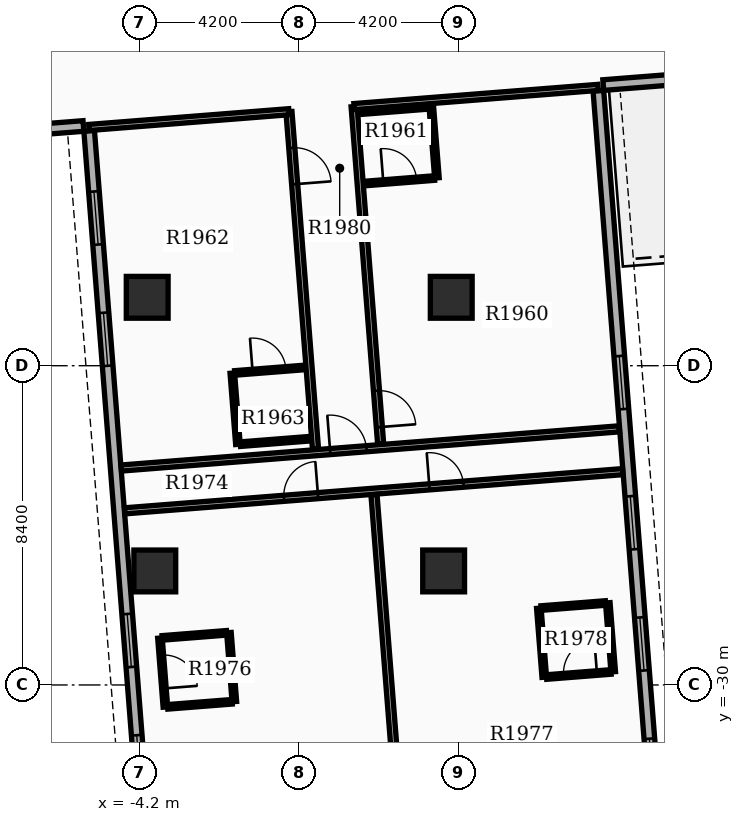
"""IFC4 building model, lengths in metres.
Left out: names, types, materials, properties, quantities, classifications, styles, units other than length and angle.
Written with IfcOpenShell. Run it as: python <this file> out.ifc"""

import sys

from ifc_helpers import new_model, si_unit, direction, frame, frame_2d, origin, origin_2d, place, context, subcontext, project, spatial, rectangle, extrude, element, fill, save


model = new_model("IFC4")
c1 = context("Model", 3, precision=1e-05, world=origin(), true_north=direction((0.0, 1.0)))
c2 = subcontext(c1, "Body", "Model", "MODEL_VIEW")
j1 = project(units=[si_unit("LENGTHUNIT", "METRE"), si_unit("PLANEANGLEUNIT", "RADIAN")], contexts=[c1])
p1 = place(None, origin())
s1 = spatial("IfcSite", under=j1, at=p1, CompositionType="ELEMENT")
p2 = place(p1, origin())
s2 = spatial("IfcBuilding", under=s1, at=p2, CompositionType="ELEMENT")
p3 = place(p2, frame((0.0, 0.0, 124.2)))
s3 = spatial("IfcBuildingStorey", under=s2, at=p3, CompositionType="ELEMENT", Elevation=124.2)
for number, where, z_axis, x_axis in (
    (1, (-4.0, -19.8, 0.0), (0.0, 0.0, 1.0), (1.0, 0.0, 0.0)),
    (2, (4.0, -19.8, 0.0), (0.0, 0.0, 1.0), (1.0, 0.0, 0.0)),
    (3, (-3.8, -27.0, 0.0), (0.0, 0.0, 1.0), (1.0, 0.0, 0.0)),
    (4, (3.8, -27.0, 0.0), (0.0, 0.0, 1.0), (1.0, 0.0, 0.0)),
):
    element("IfcColumn", number, at=place(p3, frame(where, z_axis=z_axis, x_axis=x_axis)), inside=s3, PredefinedType="COLUMN", context=c2, shape_type="SweptSolid", body=[
        extrude(rectangle(XDim=1.1, YDim=1.1, at=origin_2d()), origin(), (0.0, 0.0, 1.0), 3.9),
    ])
p4 = place(p3, frame((-5.527, -15.421, 0.0), z_axis=(0.0, 0.0, 1.0), x_axis=(0.078452802979, -0.996917828963, 0.0)))
e5 = element("IfcWall", 5, at=p4, inside=s3, PredefinedType="STANDARD", context=c2, shape_type="SweptSolid", body=[
    extrude(rectangle(XDim=20.1, YDim=0.28, at=frame_2d((10.05, 0.0))), origin(), (0.0, 0.0, 1.0), 2.97),
])
p5 = place(p4, frame((1.6, 0.0, 0.8)))
e6 = element("IfcOpeningElement", 6, at=p5, cuts=e5, PredefinedType="OPENING", context=c2, shape_type="SweptSolid", body=[
    extrude(rectangle(XDim=1.4, YDim=1.6, at=frame_2d((0.7, 0.8))), frame((0.0, 0.15, 0.0), z_axis=(0.0, -1.0, 0.0), x_axis=(1.0, 0.0, 0.0)), (0.0, 0.0, 1.0), 0.3),
])
p6 = place(p4, frame((4.8, 0.0, 0.8)))
e7 = element("IfcOpeningElement", 7, at=p6, cuts=e5, PredefinedType="OPENING", context=c2, shape_type="SweptSolid", body=[
    extrude(rectangle(XDim=1.4, YDim=1.6, at=frame_2d((0.7, 0.8))), frame((0.0, 0.15, 0.0), z_axis=(0.0, -1.0, 0.0), x_axis=(1.0, 0.0, 0.0)), (0.0, 0.0, 1.0), 0.3),
])
p7 = place(p4, frame((12.75, 0.0, 0.8)))
e8 = element("IfcOpeningElement", 8, at=p7, cuts=e5, PredefinedType="OPENING", context=c2, shape_type="SweptSolid", body=[
    extrude(rectangle(XDim=1.4, YDim=1.6, at=frame_2d((0.7, 0.8))), frame((0.0, 0.15, 0.0), z_axis=(0.0, -1.0, 0.0), x_axis=(1.0, 0.0, 0.0)), (0.0, 0.0, 1.0), 0.3),
])
p8 = place(p4, frame((15.95, 0.0, 0.8)))
e9 = element("IfcOpeningElement", 9, at=p8, cuts=e5, PredefinedType="OPENING", context=c2, shape_type="SweptSolid", body=[
    extrude(rectangle(XDim=1.4, YDim=1.6, at=frame_2d((0.7, 0.8))), frame((0.0, 0.15, 0.0), z_axis=(0.0, -1.0, 0.0), x_axis=(1.0, 0.0, 0.0)), (0.0, 0.0, 1.0), 0.3),
])
p9 = place(p3, frame((9.448, -34.405, 0.0), z_axis=(0.0, 0.0, 1.0), x_axis=(-0.078452802979, 0.996917828963, 0.0)))
e10 = element("IfcWall", 10, at=p9, inside=s3, PredefinedType="STANDARD", context=c2, shape_type="SweptSolid", body=[
    extrude(rectangle(XDim=20.1, YDim=0.28, at=frame_2d((10.05, 0.0))), origin(), (0.0, 0.0, 1.0), 2.97),
])
p10 = place(p9, frame((1.6, 0.0, 0.8)))
e11 = element("IfcOpeningElement", 11, at=p10, cuts=e10, PredefinedType="OPENING", context=c2, shape_type="SweptSolid", body=[
    extrude(rectangle(XDim=1.4, YDim=1.6, at=frame_2d((0.7, 0.8))), frame((0.0, 0.15, 0.0), z_axis=(0.0, -1.0, 0.0), x_axis=(1.0, 0.0, 0.0)), (0.0, 0.0, 1.0), 0.3),
])
p11 = place(p9, frame((4.8, 0.0, 0.8)))
e12 = element("IfcOpeningElement", 12, at=p11, cuts=e10, PredefinedType="OPENING", context=c2, shape_type="SweptSolid", body=[
    extrude(rectangle(XDim=1.4, YDim=1.6, at=frame_2d((0.7, 0.8))), frame((0.0, 0.15, 0.0), z_axis=(0.0, -1.0, 0.0), x_axis=(1.0, 0.0, 0.0)), (0.0, 0.0, 1.0), 0.3),
])
p12 = place(p9, frame((8.0, 0.0, 0.8)))
e13 = element("IfcOpeningElement", 13, at=p12, cuts=e10, PredefinedType="OPENING", context=c2, shape_type="SweptSolid", body=[
    extrude(rectangle(XDim=1.4, YDim=1.6, at=frame_2d((0.7, 0.8))), frame((0.0, 0.15, 0.0), z_axis=(0.0, -1.0, 0.0), x_axis=(1.0, 0.0, 0.0)), (0.0, 0.0, 1.0), 0.3),
])
p13 = place(p9, frame((11.7, 0.0, 0.8)))
e14 = element("IfcOpeningElement", 14, at=p13, cuts=e10, PredefinedType="OPENING", context=c2, shape_type="SweptSolid", body=[
    extrude(rectangle(XDim=1.4, YDim=1.6, at=frame_2d((0.7, 0.8))), frame((0.0, 0.15, 0.0), z_axis=(0.0, -1.0, 0.0), x_axis=(1.0, 0.0, 0.0)), (0.0, 0.0, 1.0), 0.3),
])
p14 = place(p3, frame((-11.958, -15.787, 0.0), z_axis=(0.0, 0.0, 1.0), x_axis=(0.996916125428, 0.078474447191, 0.0)))
e15 = element("IfcWall", 15, at=p14, inside=s3, PredefinedType="STANDARD", context=c2, shape_type="SweptSolid", body=[
    extrude(rectangle(XDim=6.3, YDim=0.28, at=frame_2d((3.15, 0.0))), origin(), (0.0, 0.0, 1.0), 2.97),
])
p15 = place(p3, frame((14.281, -13.722, 0.0), z_axis=(0.0, 0.0, 1.0), x_axis=(-0.99691915642, -0.078435932851, 0.0)))
e16 = element("IfcWall", 16, at=p15, inside=s3, PredefinedType="STANDARD", context=c2, shape_type="SweptSolid", body=[
    extrude(rectangle(XDim=6.3, YDim=0.28, at=frame_2d((3.15, 0.0))), origin(), (0.0, 0.0, 1.0), 2.97),
])
p16 = place(p3, frame((1.444, -14.782, 0.0), z_axis=(0.0, 0.0, 1.0), x_axis=(0.078454258523, -0.996917714418, 0.0)))
e17 = element("IfcWall", 17, at=p16, inside=s3, PredefinedType="PARTITIONING", context=c2, shape_type="SweptSolid", body=[
    extrude(rectangle(XDim=8.9, YDim=0.16, at=frame_2d((4.45, 0.0))), origin(), (0.0, 0.0, 1.0), 2.96),
])
p17 = place(p16, frame((7.5, 0.0, 0.0)))
e18 = element("IfcOpeningElement", 18, at=p17, cuts=e17, PredefinedType="OPENING", context=c2, shape_type="SweptSolid", body=[
    extrude(rectangle(XDim=0.96, YDim=2.15, at=frame_2d((0.48, 1.075))), frame((0.0, 0.09, 0.0), z_axis=(0.0, -1.0, 0.0), x_axis=(1.0, 0.0, 0.0)), (0.0, 0.0, 1.0), 0.18),
])
p18 = place(p3, frame((1.444, -14.782, 0.0), z_axis=(0.0, 0.0, 1.0), x_axis=(0.996919168289, 0.078435781998, 0.0)))
e19 = element("IfcWall", 19, at=p18, inside=s3, PredefinedType="PARTITIONING", context=c2, shape_type="SweptSolid", body=[
    extrude(rectangle(XDim=6.44, YDim=0.16, at=frame_2d((3.22, 0.0))), origin(), (0.0, 0.0, 1.0), 2.96),
])
p19 = place(p3, frame((1.744, -16.805, 0.0), z_axis=(0.0, 0.0, 1.0), x_axis=(0.996916400774, 0.0784709492, 0.0)))
e20 = element("IfcWall", 20, at=p19, inside=s3, PredefinedType="PARTITIONING", context=c2, shape_type="SweptSolid", body=[
    extrude(rectangle(XDim=1.82, YDim=0.12, at=frame_2d((0.91, 0.0))), origin(), (0.0, 0.0, 1.0), 2.96),
])
p20 = place(p19, frame((0.47, 0.0, 0.0)))
e21 = element("IfcOpeningElement", 21, at=p20, cuts=e20, PredefinedType="OPENING", context=c2, shape_type="SweptSolid", body=[
    extrude(rectangle(XDim=0.88, YDim=2.1, at=frame_2d((0.44, 1.05))), frame((0.0, 0.07, 0.0), z_axis=(0.0, -1.0, 0.0), x_axis=(1.0, 0.0, 0.0)), (0.0, 0.0, 1.0), 0.14),
])
p21 = place(p3, frame((1.596, -14.931, 0.0), z_axis=(0.0, 0.0, 1.0), x_axis=(0.996916400774, 0.0784709492, 0.0)))
e22 = element("IfcWall", 22, at=p21, inside=s3, PredefinedType="PARTITIONING", context=c2, shape_type="SweptSolid", body=[
    extrude(rectangle(XDim=1.82, YDim=0.12, at=frame_2d((0.91, 0.0))), origin(), (0.0, 0.0, 1.0), 2.96),
])
p22 = place(p3, frame((3.476, -14.783, 0.0), z_axis=(0.0, 0.0, 1.0), x_axis=(0.078444342213, -0.99691849475, 0.0)))
e23 = element("IfcWall", 23, at=p22, inside=s3, PredefinedType="PARTITIONING", context=c2, shape_type="SweptSolid", body=[
    extrude(rectangle(XDim=1.88, YDim=0.12, at=frame_2d((0.94, 0.0))), origin(), (0.0, 0.0, 1.0), 2.96),
])
p23 = place(p3, frame((-0.271, -14.917, 0.0), z_axis=(0.0, 0.0, 1.0), x_axis=(0.078454258523, -0.996917714418, 0.0)))
e24 = element("IfcWall", 24, at=p23, inside=s3, PredefinedType="PARTITIONING", context=c2, shape_type="SweptSolid", body=[
    extrude(rectangle(XDim=8.9, YDim=0.16, at=frame_2d((4.45, 0.0))), origin(), (0.0, 0.0, 1.0), 2.96),
])
p24 = place(p23, frame((0.953, 0.0, 0.0)))
e25 = element("IfcOpeningElement", 25, at=p24, cuts=e24, PredefinedType="OPENING", context=c2, shape_type="SweptSolid", body=[
    extrude(rectangle(XDim=0.96, YDim=2.15, at=frame_2d((0.48, 1.075))), frame((0.0, 0.09, 0.0), z_axis=(0.0, -1.0, 0.0), x_axis=(1.0, 0.0, 0.0)), (0.0, 0.0, 1.0), 0.18),
])
p25 = place(p3, frame((-0.271, -14.917, 0.0), z_axis=(0.0, 0.0, 1.0), x_axis=(-0.996916642178, -0.078467882272, 0.0)))
e26 = element("IfcWall", 26, at=p25, inside=s3, PredefinedType="PARTITIONING", context=c2, shape_type="SweptSolid", body=[
    extrude(rectangle(XDim=5.28, YDim=0.16, at=frame_2d((2.64, 0.0))), origin(), (0.0, 0.0, 1.0), 2.96),
])
p26 = place(p3, frame((-1.696, -21.79, 0.0), z_axis=(0.0, 0.0, 1.0), x_axis=(0.996916400774, 0.0784709492, 0.0)))
e27 = element("IfcWall", 27, at=p26, inside=s3, PredefinedType="PARTITIONING", context=c2, shape_type="SweptSolid", body=[
    extrude(rectangle(XDim=1.82, YDim=0.12, at=frame_2d((0.91, 0.0))), origin(), (0.0, 0.0, 1.0), 2.96),
])
p27 = place(p26, frame((0.47, 0.0, 0.0)))
e28 = element("IfcOpeningElement", 28, at=p27, cuts=e27, PredefinedType="OPENING", context=c2, shape_type="SweptSolid", body=[
    extrude(rectangle(XDim=0.88, YDim=2.1, at=frame_2d((0.44, 1.05))), frame((0.0, 0.07, 0.0), z_axis=(0.0, -1.0, 0.0), x_axis=(1.0, 0.0, 0.0)), (0.0, 0.0, 1.0), 0.14),
])
p28 = place(p3, frame((-1.548, -23.664, 0.0), z_axis=(0.0, 0.0, 1.0), x_axis=(0.996916400774, 0.0784709492, 0.0)))
e29 = element("IfcWall", 29, at=p28, inside=s3, PredefinedType="PARTITIONING", context=c2, shape_type="SweptSolid", body=[
    extrude(rectangle(XDim=1.82, YDim=0.12, at=frame_2d((0.91, 0.0))), origin(), (0.0, 0.0, 1.0), 2.96),
])
p29 = place(p3, frame((-1.76, -21.795, 0.0), z_axis=(0.0, 0.0, 1.0), x_axis=(0.078573415792, -0.996908329954, 0.0)))
e30 = element("IfcWall", 30, at=p29, inside=s3, PredefinedType="PARTITIONING", context=c2, shape_type="SweptSolid", body=[
    extrude(rectangle(XDim=1.88, YDim=0.12, at=frame_2d((0.94, 0.0))), origin(), (0.0, 0.0, 1.0), 2.96),
])
p30 = place(p3, frame((-4.68, -24.292, 0.0), z_axis=(0.0, 0.0, 1.0), x_axis=(0.996917447065, 0.078457655694, 0.0)))
e31 = element("IfcWall", 31, at=p30, inside=s3, PredefinedType="PARTITIONING", context=c2, shape_type="SweptSolid", body=[
    extrude(rectangle(XDim=13.144, YDim=0.16, at=frame_2d((6.572, 0.0))), origin(), (0.0, 0.0, 1.0), 2.96),
])
p31 = place(p30, frame((5.512, 0.0, 0.0)))
e32 = element("IfcOpeningElement", 32, at=p31, cuts=e31, PredefinedType="OPENING", context=c2, shape_type="SweptSolid", body=[
    extrude(rectangle(XDim=0.96, YDim=2.15, at=frame_2d((0.48, 1.075))), frame((0.0, 0.09, 0.0), z_axis=(0.0, -1.0, 0.0), x_axis=(1.0, 0.0, 0.0)), (0.0, 0.0, 1.0), 0.18),
])
p32 = place(p3, frame((-4.592, -25.419, 0.0), z_axis=(0.0, 0.0, 1.0), x_axis=(0.996915994096, 0.078476115573, 0.0)))
e33 = element("IfcWall", 33, at=p32, inside=s3, PredefinedType="PARTITIONING", context=c2, shape_type="SweptSolid", body=[
    extrude(rectangle(XDim=13.144, YDim=0.16, at=frame_2d((6.572, 0.0))), origin(), (0.0, 0.0, 1.0), 2.96),
])
p33 = place(p32, frame((4.202, 0.0, 0.0)))
e34 = element("IfcOpeningElement", 34, at=p33, cuts=e33, PredefinedType="OPENING", context=c2, shape_type="SweptSolid", body=[
    extrude(rectangle(XDim=0.9, YDim=2.15, at=frame_2d((0.45, 1.075))), frame((0.0, 0.09, 0.0), z_axis=(0.0, -1.0, 0.0), x_axis=(1.0, 0.0, 0.0)), (0.0, 0.0, 1.0), 0.18),
])
p34 = place(p32, frame((8.042, 0.0, 0.0)))
e35 = element("IfcOpeningElement", 35, at=p34, cuts=e33, PredefinedType="OPENING", context=c2, shape_type="SweptSolid", body=[
    extrude(rectangle(XDim=0.9, YDim=2.15, at=frame_2d((0.45, 1.075))), frame((0.0, 0.09, 0.0), z_axis=(0.0, -1.0, 0.0), x_axis=(1.0, 0.0, 0.0)), (0.0, 0.0, 1.0), 0.18),
])
p35 = place(p3, frame((1.967, -24.993, 0.0), z_axis=(0.0, 0.0, 1.0), x_axis=(0.078446753713, -0.996918304994, 0.0)))
e36 = element("IfcWall", 36, at=p35, inside=s3, PredefinedType="PARTITIONING", context=c2, shape_type="SweptSolid", body=[
    extrude(rectangle(XDim=9.962, YDim=0.16, at=frame_2d((4.981, 0.0))), origin(), (0.0, 0.0, 1.0), 2.96),
])
p36 = place(p3, frame((-3.664, -28.766, 0.0), z_axis=(0.0, 0.0, 1.0), x_axis=(0.0784709492, -0.996916400774, 0.0)))
e37 = element("IfcWall", 37, at=p36, inside=s3, PredefinedType="PARTITIONING", context=c2, shape_type="SweptSolid", body=[
    extrude(rectangle(XDim=1.82, YDim=0.12, at=frame_2d((0.91, 0.0))), origin(), (0.0, 0.0, 1.0), 2.96),
])
p37 = place(p36, frame((0.45, 0.0, 0.0)))
e38 = element("IfcOpeningElement", 38, at=p37, cuts=e37, PredefinedType="OPENING", context=c2, shape_type="SweptSolid", body=[
    extrude(rectangle(XDim=0.88, YDim=2.1, at=frame_2d((0.44, 1.05))), frame((0.0, 0.07, 0.0), z_axis=(0.0, -1.0, 0.0), x_axis=(1.0, 0.0, 0.0)), (0.0, 0.0, 1.0), 0.14),
])
p38 = place(p3, frame((-1.85, -28.623, 0.0), z_axis=(0.0, 0.0, 1.0), x_axis=(0.0784709492, -0.996916400774, 0.0)))
e39 = element("IfcWall", 39, at=p38, inside=s3, PredefinedType="PARTITIONING", context=c2, shape_type="SweptSolid", body=[
    extrude(rectangle(XDim=1.82, YDim=0.12, at=frame_2d((0.91, 0.0))), origin(), (0.0, 0.0, 1.0), 2.96),
])
p39 = place(p3, frame((-3.604, -28.761, 0.0), z_axis=(0.0, 0.0, 1.0), x_axis=(0.996920349899, 0.078420762289, 0.0)))
e40 = element("IfcWall", 40, at=p39, inside=s3, PredefinedType="PARTITIONING", context=c2, shape_type="SweptSolid", body=[
    extrude(rectangle(XDim=1.7, YDim=0.12, at=frame_2d((0.85, 0.0))), origin(), (0.0, 0.0, 1.0), 2.96),
])
p40 = place(p3, frame((-3.462, -30.576, 0.0), z_axis=(0.0, 0.0, 1.0), x_axis=(0.996909111094, 0.078563504361, 0.0)))
e41 = element("IfcWall", 41, at=p40, inside=s3, PredefinedType="PARTITIONING", context=c2, shape_type="SweptSolid", body=[
    extrude(rectangle(XDim=1.7, YDim=0.12, at=frame_2d((0.85, 0.0))), origin(), (0.0, 0.0, 1.0), 2.96),
])
p41 = place(p3, frame((6.305, -27.982, 0.0), z_axis=(0.0, 0.0, 1.0), x_axis=(0.078481444107, -0.996915574626, 0.0)))
e42 = element("IfcWall", 42, at=p41, inside=s3, PredefinedType="PARTITIONING", context=c2, shape_type="SweptSolid", body=[
    extrude(rectangle(XDim=1.82, YDim=0.12, at=frame_2d((0.91, 0.0))), origin(), (0.0, 0.0, 1.0), 2.96),
])
p42 = place(p3, frame((8.119, -27.839, 0.0), z_axis=(0.0, 0.0, 1.0), x_axis=(0.0784709492, -0.996916400774, 0.0)))
e43 = element("IfcWall", 43, at=p42, inside=s3, PredefinedType="PARTITIONING", context=c2, shape_type="SweptSolid", body=[
    extrude(rectangle(XDim=1.82, YDim=0.12, at=frame_2d((0.91, 0.0))), origin(), (0.0, 0.0, 1.0), 2.96),
])
p43 = place(p3, frame((6.365, -27.977, 0.0), z_axis=(0.0, 0.0, 1.0), x_axis=(0.996920349899, 0.078420762289, 0.0)))
e44 = element("IfcWall", 44, at=p43, inside=s3, PredefinedType="PARTITIONING", context=c2, shape_type="SweptSolid", body=[
    extrude(rectangle(XDim=1.7, YDim=0.12, at=frame_2d((0.85, 0.0))), origin(), (0.0, 0.0, 1.0), 2.96),
])
p44 = place(p3, frame((6.508, -29.791, 0.0), z_axis=(0.0, 0.0, 1.0), x_axis=(0.996920349899, 0.078420762289, 0.0)))
e45 = element("IfcWall", 45, at=p44, inside=s3, PredefinedType="PARTITIONING", context=c2, shape_type="SweptSolid", body=[
    extrude(rectangle(XDim=1.7, YDim=0.12, at=frame_2d((0.85, 0.0))), origin(), (0.0, 0.0, 1.0), 2.96),
])
p45 = place(p44, frame((0.45, 0.0, 0.0)))
e46 = element("IfcOpeningElement", 46, at=p45, cuts=e45, PredefinedType="OPENING", context=c2, shape_type="SweptSolid", body=[
    extrude(rectangle(XDim=0.88, YDim=2.1, at=frame_2d((0.44, 1.05))), frame((0.0, 0.07, 0.0), z_axis=(0.0, -1.0, 0.0), x_axis=(1.0, 0.0, 0.0)), (0.0, 0.0, 1.0), 0.14),
])
p46 = place(p5, origin())
e47 = element("IfcWindow", 47, at=p46, inside=s3, PartitioningType="SINGLE_PANEL", PredefinedType="WINDOW", context=c2, shape_type="SweptSolid", body=[
    extrude(rectangle(XDim=1.4, YDim=1.6, at=frame_2d((0.7, 0.8))), frame((0.0, 0.03, 0.0), z_axis=(0.0, -1.0, 0.0), x_axis=(1.0, 0.0, 0.0)), (0.0, 0.0, 1.0), 0.06),
])
fill(e6, e47)
p47 = place(p6, origin())
e48 = element("IfcWindow", 48, at=p47, inside=s3, PartitioningType="SINGLE_PANEL", PredefinedType="WINDOW", context=c2, shape_type="SweptSolid", body=[
    extrude(rectangle(XDim=1.4, YDim=1.6, at=frame_2d((0.7, 0.8))), frame((0.0, 0.03, 0.0), z_axis=(0.0, -1.0, 0.0), x_axis=(1.0, 0.0, 0.0)), (0.0, 0.0, 1.0), 0.06),
])
fill(e7, e48)
p48 = place(p7, origin())
e49 = element("IfcWindow", 49, at=p48, inside=s3, PartitioningType="SINGLE_PANEL", PredefinedType="WINDOW", context=c2, shape_type="SweptSolid", body=[
    extrude(rectangle(XDim=1.4, YDim=1.6, at=frame_2d((0.7, 0.8))), frame((0.0, 0.03, 0.0), z_axis=(0.0, -1.0, 0.0), x_axis=(1.0, 0.0, 0.0)), (0.0, 0.0, 1.0), 0.06),
])
fill(e8, e49)
p49 = place(p8, origin())
e50 = element("IfcWindow", 50, at=p49, inside=s3, PartitioningType="SINGLE_PANEL", PredefinedType="WINDOW", context=c2, shape_type="SweptSolid", body=[
    extrude(rectangle(XDim=1.4, YDim=1.6, at=frame_2d((0.7, 0.8))), frame((0.0, 0.03, 0.0), z_axis=(0.0, -1.0, 0.0), x_axis=(1.0, 0.0, 0.0)), (0.0, 0.0, 1.0), 0.06),
])
fill(e9, e50)
p50 = place(p10, origin())
e51 = element("IfcWindow", 51, at=p50, inside=s3, PartitioningType="SINGLE_PANEL", PredefinedType="WINDOW", context=c2, shape_type="SweptSolid", body=[
    extrude(rectangle(XDim=1.4, YDim=1.6, at=frame_2d((0.7, 0.8))), frame((0.0, 0.03, 0.0), z_axis=(0.0, -1.0, 0.0), x_axis=(1.0, 0.0, 0.0)), (0.0, 0.0, 1.0), 0.06),
])
fill(e11, e51)
p51 = place(p11, origin())
e52 = element("IfcWindow", 52, at=p51, inside=s3, PartitioningType="SINGLE_PANEL", PredefinedType="WINDOW", context=c2, shape_type="SweptSolid", body=[
    extrude(rectangle(XDim=1.4, YDim=1.6, at=frame_2d((0.7, 0.8))), frame((0.0, 0.03, 0.0), z_axis=(0.0, -1.0, 0.0), x_axis=(1.0, 0.0, 0.0)), (0.0, 0.0, 1.0), 0.06),
])
fill(e12, e52)
p52 = place(p12, origin())
e53 = element("IfcWindow", 53, at=p52, inside=s3, PartitioningType="SINGLE_PANEL", PredefinedType="WINDOW", context=c2, shape_type="SweptSolid", body=[
    extrude(rectangle(XDim=1.4, YDim=1.6, at=frame_2d((0.7, 0.8))), frame((0.0, 0.03, 0.0), z_axis=(0.0, -1.0, 0.0), x_axis=(1.0, 0.0, 0.0)), (0.0, 0.0, 1.0), 0.06),
])
fill(e13, e53)
p53 = place(p13, origin())
e54 = element("IfcWindow", 54, at=p53, inside=s3, PartitioningType="SINGLE_PANEL", PredefinedType="WINDOW", context=c2, shape_type="SweptSolid", body=[
    extrude(rectangle(XDim=1.4, YDim=1.6, at=frame_2d((0.7, 0.8))), frame((0.0, 0.03, 0.0), z_axis=(0.0, -1.0, 0.0), x_axis=(1.0, 0.0, 0.0)), (0.0, 0.0, 1.0), 0.06),
])
fill(e14, e54)
p54 = place(p17, origin())
e55 = element("IfcDoor", 55, at=p54, inside=s3, OperationType="SINGLE_SWING_RIGHT", PredefinedType="DOOR", context=c2, shape_type="SweptSolid", body=[
    extrude(rectangle(XDim=0.96, YDim=2.15, at=frame_2d((0.48, 1.075))), frame((0.0, 0.025, 0.0), z_axis=(0.0, -1.0, 0.0), x_axis=(1.0, 0.0, 0.0)), (0.0, 0.0, 1.0), 0.05),
])
fill(e18, e55)
p55 = place(p20, origin())
e56 = element("IfcDoor", 56, at=p55, inside=s3, OperationType="SINGLE_SWING_LEFT", PredefinedType="DOOR", context=c2, shape_type="SweptSolid", body=[
    extrude(rectangle(XDim=0.88, YDim=2.1, at=frame_2d((0.44, 1.05))), frame((0.0, 0.025, 0.0), z_axis=(0.0, -1.0, 0.0), x_axis=(1.0, 0.0, 0.0)), (0.0, 0.0, 1.0), 0.05),
])
fill(e21, e56)
p56 = place(p24, origin())
e57 = element("IfcDoor", 57, at=p56, inside=s3, OperationType="SINGLE_SWING_RIGHT", PredefinedType="DOOR", context=c2, shape_type="SweptSolid", body=[
    extrude(rectangle(XDim=0.96, YDim=2.15, at=frame_2d((0.48, 1.075))), frame((0.0, 0.025, 0.0), z_axis=(0.0, -1.0, 0.0), x_axis=(1.0, 0.0, 0.0)), (0.0, 0.0, 1.0), 0.05),
])
fill(e25, e57)
p57 = place(p27, origin())
e58 = element("IfcDoor", 58, at=p57, inside=s3, OperationType="SINGLE_SWING_LEFT", PredefinedType="DOOR", context=c2, shape_type="SweptSolid", body=[
    extrude(rectangle(XDim=0.88, YDim=2.1, at=frame_2d((0.44, 1.05))), frame((0.0, 0.025, 0.0), z_axis=(0.0, -1.0, 0.0), x_axis=(1.0, 0.0, 0.0)), (0.0, 0.0, 1.0), 0.05),
])
fill(e28, e58)
p58 = place(p31, origin())
e59 = element("IfcDoor", 59, at=p58, inside=s3, OperationType="SINGLE_SWING_LEFT", PredefinedType="DOOR", context=c2, shape_type="SweptSolid", body=[
    extrude(rectangle(XDim=0.96, YDim=2.15, at=frame_2d((0.48, 1.075))), frame((0.0, 0.025, 0.0), z_axis=(0.0, -1.0, 0.0), x_axis=(1.0, 0.0, 0.0)), (0.0, 0.0, 1.0), 0.05),
])
fill(e32, e59)
p59 = place(p33, origin())
e60 = element("IfcDoor", 60, at=p59, inside=s3, OperationType="SINGLE_SWING_RIGHT", PredefinedType="DOOR", context=c2, shape_type="SweptSolid", body=[
    extrude(rectangle(XDim=0.9, YDim=2.15, at=frame_2d((0.45, 1.075))), frame((0.0, 0.025, 0.0), z_axis=(0.0, -1.0, 0.0), x_axis=(1.0, 0.0, 0.0)), (0.0, 0.0, 1.0), 0.05),
])
fill(e34, e60)
p60 = place(p37, origin())
e61 = element("IfcDoor", 61, at=p60, inside=s3, OperationType="SINGLE_SWING_RIGHT", PredefinedType="DOOR", context=c2, shape_type="SweptSolid", body=[
    extrude(rectangle(XDim=0.88, YDim=2.1, at=frame_2d((0.44, 1.05))), frame((0.0, 0.025, 0.0), z_axis=(0.0, -1.0, 0.0), x_axis=(1.0, 0.0, 0.0)), (0.0, 0.0, 1.0), 0.05),
])
fill(e38, e61)
p61 = place(p34, origin())
e62 = element("IfcDoor", 62, at=p61, inside=s3, OperationType="SINGLE_SWING_LEFT", PredefinedType="DOOR", context=c2, shape_type="SweptSolid", body=[
    extrude(rectangle(XDim=0.9, YDim=2.15, at=frame_2d((0.45, 1.075))), frame((0.0, 0.025, 0.0), z_axis=(0.0, -1.0, 0.0), x_axis=(1.0, 0.0, 0.0)), (0.0, 0.0, 1.0), 0.05),
])
fill(e35, e62)
p62 = place(p45, origin())
e63 = element("IfcDoor", 63, at=p62, inside=s3, OperationType="SINGLE_SWING_RIGHT", PredefinedType="DOOR", context=c2, shape_type="SweptSolid", body=[
    extrude(rectangle(XDim=0.88, YDim=2.1, at=frame_2d((0.44, 1.05))), frame((0.0, 0.025, 0.0), z_axis=(0.0, -1.0, 0.0), x_axis=(1.0, 0.0, 0.0)), (0.0, 0.0, 1.0), 0.05),
])
fill(e46, e63)
save(model, sys.argv[1])
